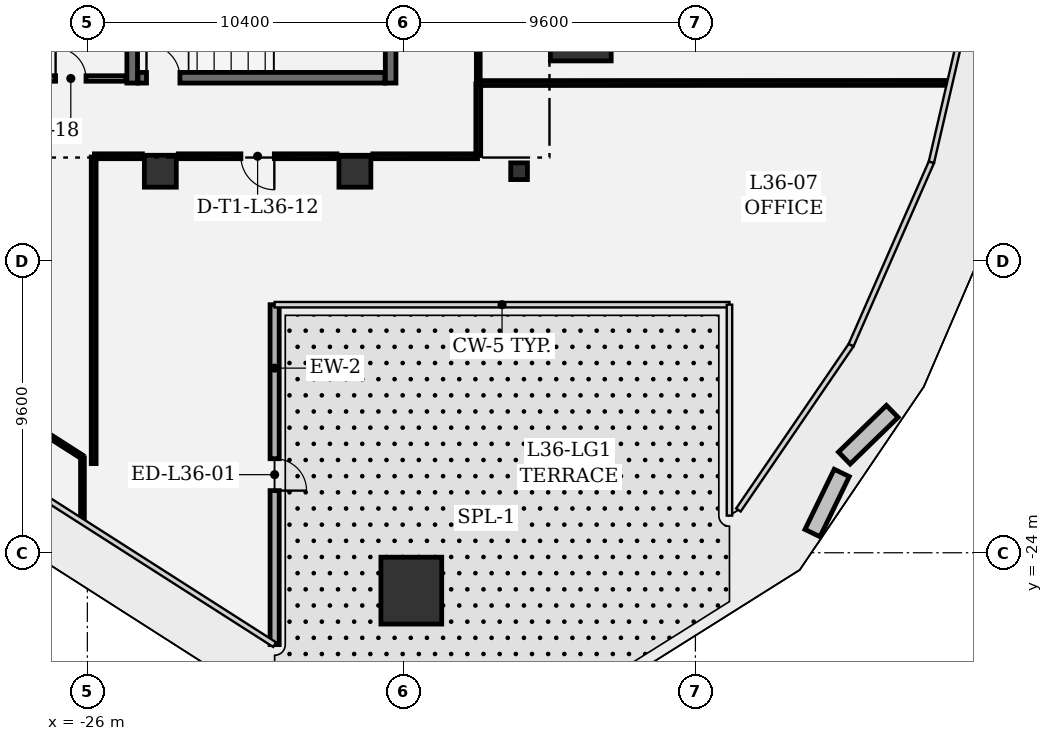
"""IFC4 building model, lengths in metres.
Left out: names, types, materials, properties, quantities, classifications, styles, units other than length and angle.
Written with IfcOpenShell. Run it as: python <this file> out.ifc"""

import sys

from ifc_helpers import new_model, si_unit, direction, frame, frame_2d, origin, origin_2d, place, context, subcontext, project, spatial, rectangle, extrude, element, fill, save


model = new_model("IFC4")
c1 = context("Model", 3, precision=1e-05, world=origin(), true_north=direction((0.0, 1.0)))
c2 = subcontext(c1, "Body", "Model", "MODEL_VIEW")
j1 = project(units=[si_unit("LENGTHUNIT", "METRE"), si_unit("PLANEANGLEUNIT", "RADIAN")], contexts=[c1])
p1 = place(None, origin())
s1 = spatial("IfcSite", under=j1, at=p1, CompositionType="ELEMENT")
p2 = place(p1, origin())
s2 = spatial("IfcBuilding", under=s1, at=p2, CompositionType="ELEMENT")
p3 = place(p2, frame((0.0, 0.0, 158.4)))
s3 = spatial("IfcBuildingStorey", under=s2, at=p3, CompositionType="ELEMENT", Elevation=158.4)
for number, where, z_axis, x_axis in (
    (1, (-15.344, -25.246, 0.0), (0.0, 0.0, 1.0), (1.0, 0.0, 0.0)),
    (2, (-9.77, -6.721, 0.0), (0.0, 0.0, 1.0), (1.0, 0.0, 0.0)),
):
    element("IfcColumn", number, at=place(p3, frame(where, z_axis=z_axis, x_axis=x_axis)), inside=s3, PredefinedType="COLUMN", context=c2, shape_type="SweptSolid", body=[
        extrude(rectangle(XDim=2.0, YDim=2.2, at=origin_2d()), origin(), (0.0, 0.0, 1.0), 4.05),
    ])
for number, where, z_axis, x_axis in (
    (3, (-17.2, -11.45, 0.0), (0.0, 0.0, 1.0), (1.0, 0.0, 0.0)),
    (4, (-23.6, -11.45, 0.0), (0.0, 0.0, 1.0), (1.0, 0.0, 0.0)),
):
    element("IfcColumn", number, at=place(p3, frame(where, z_axis=z_axis, x_axis=x_axis)), inside=s3, PredefinedType="COLUMN", context=c2, shape_type="SweptSolid", body=[
        extrude(rectangle(XDim=1.05, YDim=1.05, at=origin_2d()), origin(), (0.0, 0.0, 1.0), 4.05),
    ])
p4 = place(p3, frame((-11.8, -11.45, 0.0), z_axis=(0.0, 0.0, 1.0), x_axis=(1.0, 0.0, 0.0)))
e5 = element("IfcColumn", 5, at=p4, inside=s3, PredefinedType="COLUMN", context=c2, shape_type="SweptSolid", body=[
    extrude(rectangle(XDim=0.55, YDim=0.55, at=origin_2d()), origin(), (0.0, 0.0, 1.0), 4.05),
])
p5 = place(p3, frame((-19.84, -15.84, 0.0), z_axis=(0.0, 0.0, 1.0), x_axis=(0.0, -1.0, 0.0)))
e6 = element("IfcWall", 6, at=p5, inside=s3, PredefinedType="SOLIDWALL", context=c2, shape_type="SweptSolid", body=[
    extrude(rectangle(XDim=11.182, YDim=0.3, at=frame_2d((5.591, 0.0))), origin(), (0.0, 0.0, 1.0), 2.895),
])
p6 = place(p5, frame((5.066, 0.0, 0.0)))
e7 = element("IfcOpeningElement", 7, at=p6, cuts=e6, PredefinedType="OPENING", context=c2, shape_type="SweptSolid", body=[
    extrude(rectangle(XDim=1.05, YDim=2.2, at=frame_2d((0.525, 1.1))), frame((0.0, 0.16, 0.0), z_axis=(0.0, -1.0, 0.0), x_axis=(1.0, 0.0, 0.0)), (0.0, 0.0, 1.0), 0.32),
])
for number, where, z_axis, x_axis in (
    (8, (-24.525, -4.34, 0.0), (0.0, 0.0, 1.0), (0.0, -1.0, 0.0)),
    (9, (-16.025, -8.55, 0.0), (0.0, 0.0, 1.0), (0.0, 1.0, 0.0)),
):
    element("IfcWall", number, at=place(p3, frame(where, z_axis=z_axis, x_axis=x_axis)), inside=s3, PredefinedType="SHEAR", context=c2, shape_type="SweptSolid", body=[
        extrude(rectangle(XDim=4.21, YDim=0.35, at=frame_2d((2.105, 0.0))), origin(), (0.0, 0.0, 1.0), 3.78),
    ])
p7 = place(p3, frame((-24.335, -8.375, 0.0), z_axis=(0.0, 0.0, 1.0), x_axis=(1.0, 0.0, 0.0)))
e10 = element("IfcWall", 10, at=p7, inside=s3, PredefinedType="SHEAR", context=c2, shape_type="SweptSolid", body=[
    extrude(rectangle(XDim=8.12, YDim=0.35, at=frame_2d((4.06, 0.0))), origin(), (0.0, 0.0, 1.0), 3.78),
])
p8 = place(p7, frame((0.28, 0.0, 0.0)))
e11 = element("IfcOpeningElement", 11, at=p8, cuts=e10, PredefinedType="OPENING", context=c2, shape_type="SweptSolid", body=[
    extrude(rectangle(XDim=1.1, YDim=2.2, at=frame_2d((0.55, 1.1))), frame((0.0, 0.185, 0.0), z_axis=(0.0, -1.0, 0.0), x_axis=(1.0, 0.0, 0.0)), (0.0, 0.0, 1.0), 0.37),
])
p9 = place(p3, frame((-28.355, -8.4, 0.0), z_axis=(0.0, 0.0, 1.0), x_axis=(1.0, 0.0, 0.0)))
e12 = element("IfcWall", 12, at=p9, inside=s3, PredefinedType="PARTITIONING", context=c2, shape_type="SweptSolid", body=[
    extrude(rectangle(XDim=3.622, YDim=0.18, at=frame_2d((1.811, 0.0))), origin(), (0.0, 0.0, 1.0), 3.78),
])
p10 = place(p9, frame((1.311, 0.0, 0.0)))
e13 = element("IfcOpeningElement", 13, at=p10, cuts=e12, PredefinedType="OPENING", context=c2, shape_type="SweptSolid", body=[
    extrude(rectangle(XDim=1.0, YDim=2.15, at=frame_2d((0.5, 1.075))), frame((0.0, 0.1, 0.0), z_axis=(0.0, -1.0, 0.0), x_axis=(1.0, 0.0, 0.0)), (0.0, 0.0, 1.0), 0.2),
])
p11 = place(p3, frame((-26.161, -22.902, 0.0), z_axis=(0.0, 0.0, 1.0), x_axis=(0.0, 1.0, 0.0)))
e14 = element("IfcWall", 14, at=p11, inside=s3, PredefinedType="PARTITIONING", context=c2, shape_type="SweptSolid", body=[
    extrude(rectangle(XDim=2.021, YDim=0.125, at=frame_2d((1.011, 0.0))), origin(), (0.0, 0.0, 1.0), 3.78),
])
p12 = place(p3, frame((-28.587, -19.305, 0.0), z_axis=(0.0, 0.0, 1.0), x_axis=(0.842581967006, -0.538568128352, 0.0)))
e15 = element("IfcWall", 15, at=p12, inside=s3, PredefinedType="PARTITIONING", context=c2, shape_type="SweptSolid", body=[
    extrude(rectangle(XDim=2.854, YDim=0.125, at=frame_2d((1.427, 0.0))), origin(), (0.0, 0.0, 1.0), 3.78),
])
p13 = place(p3, frame((2.287, -8.545, 0.0), z_axis=(0.0, 0.0, 1.0), x_axis=(-0.999999939213, -0.000348675014, 0.0)))
e16 = element("IfcWall", 16, at=p13, inside=s3, PredefinedType="PARTITIONING", context=c2, shape_type="SweptSolid", body=[
    extrude(rectangle(XDim=15.404, YDim=0.16, at=frame_2d((7.702, 0.0))), origin(), (0.0, 0.0, 1.0), 2.895),
])
p14 = place(p3, frame((-13.142, -10.933, 0.0), z_axis=(0.0, 0.0, 1.0), x_axis=(0.0, 1.0, 0.0)))
e17 = element("IfcWall", 17, at=p14, inside=s3, PredefinedType="PARTITIONING", context=c2, shape_type="SweptSolid", body=[
    extrude(rectangle(XDim=2.358, YDim=0.16, at=frame_2d((1.179, 0.0))), origin(), (0.0, 0.0, 1.0), 3.78),
])
p15 = place(p3, frame((-13.167, -10.958, 0.0), z_axis=(0.0, 0.0, 1.0), x_axis=(-1.0, 0.0, 0.0)))
e18 = element("IfcWall", 18, at=p15, inside=s3, PredefinedType="PARTITIONING", context=c2, shape_type="SweptSolid", body=[
    extrude(rectangle(XDim=3.443, YDim=0.16, at=frame_2d((1.722, 0.0))), origin(), (0.0, 0.0, 1.0), 2.895),
])
p16 = place(p3, frame((-17.79, -10.958, 0.0), z_axis=(0.0, 0.0, 1.0), x_axis=(-1.0, 0.0, 0.0)))
e19 = element("IfcWall", 19, at=p16, inside=s3, PredefinedType="PARTITIONING", context=c2, shape_type="SweptSolid", body=[
    extrude(rectangle(XDim=5.22, YDim=0.16, at=frame_2d((2.61, 0.0))), origin(), (0.0, 0.0, 1.0), 3.78),
])
p17 = place(p16, frame((2.06, 0.0, 0.0)))
e20 = element("IfcOpeningElement", 20, at=p17, cuts=e19, PredefinedType="OPENING", context=c2, shape_type="SweptSolid", body=[
    extrude(rectangle(XDim=1.1, YDim=2.15, at=frame_2d((0.55, 1.075))), frame((0.0, 0.09, 0.0), z_axis=(0.0, -1.0, 0.0), x_axis=(1.0, 0.0, 0.0)), (0.0, 0.0, 1.0), 0.18),
])
p18 = place(p3, frame((-24.19, -10.958, 0.0), z_axis=(0.0, 0.0, 1.0), x_axis=(-1.0, 0.0, 0.0)))
e21 = element("IfcWall", 21, at=p18, inside=s3, PredefinedType="PARTITIONING", context=c2, shape_type="SweptSolid", body=[
    extrude(rectangle(XDim=1.577, YDim=0.16, at=frame_2d((0.789, 0.0))), origin(), (0.0, 0.0, 1.0), 3.78),
])
p19 = place(p3, frame((-25.792, -10.983, 0.0), z_axis=(0.0, 0.0, 1.0), x_axis=(0.0, -1.0, 0.0)))
e22 = element("IfcWall", 22, at=p19, inside=s3, PredefinedType="PARTITIONING", context=c2, shape_type="SweptSolid", body=[
    extrude(rectangle(XDim=10.083, YDim=0.16, at=frame_2d((5.042, 0.0))), origin(), (0.0, 0.0, 1.0), 3.78),
])
p20 = place(p3, frame((-13.142, 0.604, 0.0), z_axis=(0.0, 0.0, 1.0), x_axis=(0.0, -1.0, 0.0)))
e23 = element("IfcWall", 23, at=p20, inside=s3, PredefinedType="PARTITIONING", context=c2, shape_type="SweptSolid", body=[
    extrude(rectangle(XDim=9.121, YDim=0.125, at=frame_2d((4.561, 0.0))), origin(), (0.0, 0.0, 1.0), 3.78),
])
p21 = place(p20, frame((4.086, 0.0, 0.0)))
e24 = element("IfcOpeningElement", 24, at=p21, cuts=e23, PredefinedType="OPENING", context=c2, shape_type="SweptSolid", body=[
    extrude(rectangle(XDim=0.95, YDim=2.15, at=frame_2d((0.475, 1.075))), frame((0.0, 0.073, 0.0), z_axis=(0.0, -1.0, 0.0), x_axis=(1.0, 0.0, 0.0)), (0.0, 0.0, 1.0), 0.145),
])
p22 = place(p6, origin())
e25 = element("IfcDoor", 25, at=p22, inside=s3, OperationType="SINGLE_SWING_RIGHT", PredefinedType="DOOR", context=c2, shape_type="SweptSolid", body=[
    extrude(rectangle(XDim=1.05, YDim=2.2, at=frame_2d((0.525, 1.1))), frame((0.0, 0.025, 0.0), z_axis=(0.0, -1.0, 0.0), x_axis=(1.0, 0.0, 0.0)), (0.0, 0.0, 1.0), 0.05),
])
fill(e7, e25)
p23 = place(p8, origin())
e26 = element("IfcDoor", 26, at=p23, inside=s3, OperationType="SINGLE_SWING_LEFT", PredefinedType="DOOR", context=c2, shape_type="SweptSolid", body=[
    extrude(rectangle(XDim=1.1, YDim=2.2, at=frame_2d((0.55, 1.1))), frame((0.0, 0.025, 0.0), z_axis=(0.0, -1.0, 0.0), x_axis=(1.0, 0.0, 0.0)), (0.0, 0.0, 1.0), 0.05),
])
fill(e11, e26)
p24 = place(p17, origin())
e27 = element("IfcDoor", 27, at=p24, inside=s3, OperationType="SINGLE_SWING_LEFT", PredefinedType="DOOR", context=c2, shape_type="SweptSolid", body=[
    extrude(rectangle(XDim=1.1, YDim=2.15, at=frame_2d((0.55, 1.075))), frame((0.0, 0.025, 0.0), z_axis=(0.0, -1.0, 0.0), x_axis=(1.0, 0.0, 0.0)), (0.0, 0.0, 1.0), 0.05),
])
fill(e20, e27)
p25 = place(p10, origin())
e28 = element("IfcDoor", 28, at=p25, inside=s3, OperationType="SINGLE_SWING_LEFT", PredefinedType="DOOR", context=c2, shape_type="SweptSolid", body=[
    extrude(rectangle(XDim=1.0, YDim=2.15, at=frame_2d((0.5, 1.075))), frame((0.0, 0.025, 0.0), z_axis=(0.0, -1.0, 0.0), x_axis=(1.0, 0.0, 0.0)), (0.0, 0.0, 1.0), 0.05),
])
fill(e13, e28)
save(model, sys.argv[1])
